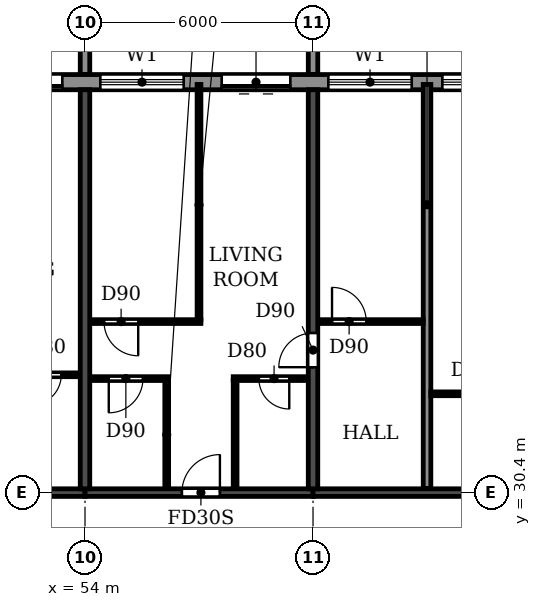
"""IFC4 building model, lengths in metres.
Left out: names, types, materials, properties, quantities, classifications, styles, units other than length and angle.
Written with IfcOpenShell. Run it as: python <this file> out.ifc"""

import sys

from ifc_helpers import new_model, si_unit, direction, frame, frame_2d, origin, place, context, subcontext, project, spatial, polyline, rectangle, outline, extrude, source, transform, mapped, element, fill, save


model = new_model("IFC4")
c1 = context("Model", 3, precision=1e-05, world=origin(), true_north=direction((0.0, 1.0)))
c2 = subcontext(c1, "Body", "Model", "MODEL_VIEW")
j1 = project(units=[si_unit("LENGTHUNIT", "METRE"), si_unit("PLANEANGLEUNIT", "RADIAN")], contexts=[c1])
p1 = place(None, origin())
s1 = spatial("IfcSite", under=j1, at=p1, CompositionType="ELEMENT")
p2 = place(p1, origin())
s2 = spatial("IfcBuilding", under=s1, at=p2, CompositionType="ELEMENT")
p3 = place(p2, frame((0.0, 0.0, 171.9)))
s3 = spatial("IfcBuildingStorey", under=s2, at=p3, CompositionType="ELEMENT", Elevation=171.9)
p4 = place(p3, frame((54.0, 30.5, 0.0), z_axis=(0.0, 0.0, 1.0), x_axis=(0.0, 1.0, 0.0)))
e1 = element("IfcWall", 1, at=p4, inside=s3, PredefinedType="SHEAR", context=c2, shape_type="SweptSolid", body=[
    extrude(rectangle(XDim=10.5, YDim=0.25, at=frame_2d((5.25, 0.0))), origin(), (0.0, 0.0, 1.0), 3.08),
])
p5 = place(p3, frame((60.0, 30.5, 0.0), z_axis=(0.0, 0.0, 1.0), x_axis=(0.0, 1.0, 0.0)))
e2 = element("IfcWall", 2, at=p5, inside=s3, PredefinedType="SHEAR", context=c2, shape_type="SweptSolid", body=[
    extrude(rectangle(XDim=10.5, YDim=0.25, at=frame_2d((5.25, 0.0))), origin(), (0.0, 0.0, 1.0), 3.08),
])
p6 = place(p5, frame((3.2, 0.0, 0.0)))
e3 = element("IfcOpeningElement", 3, at=p6, cuts=e2, PredefinedType="OPENING", context=c2, shape_type="SweptSolid", body=[
    extrude(rectangle(XDim=0.9, YDim=2.1, at=frame_2d((0.45, 1.05))), frame((0.0, 0.135, 0.0), z_axis=(0.0, -1.0, 0.0), x_axis=(1.0, 0.0, 0.0)), (0.0, 0.0, 1.0), 0.27),
])
p7 = place(p3, frame((48.0, 30.4, 0.0), z_axis=(0.0, 0.0, 1.0), x_axis=(1.0, 0.0, 0.0)))
e4 = element("IfcWall", 4, at=p7, inside=s3, PredefinedType="SHEAR", context=c2, shape_type="SweptSolid", body=[
    extrude(rectangle(XDim=6.0, YDim=0.2, at=frame_2d((3.0, 0.0))), origin(), (0.0, 0.0, 1.0), 2.48),
])
p8 = place(p7, frame((2.55, 0.0, 0.0)))
e5 = element("IfcOpeningElement", 5, at=p8, cuts=e4, PredefinedType="OPENING", context=c2, shape_type="SweptSolid", body=[
    extrude(rectangle(XDim=1.0, YDim=2.1, at=frame_2d((0.5, 1.05))), frame((0.0, 0.11, 0.0), z_axis=(0.0, -1.0, 0.0), x_axis=(1.0, 0.0, 0.0)), (0.0, 0.0, 1.0), 0.22),
])
p9 = place(p3, frame((54.0, 30.4, 0.0), z_axis=(0.0, 0.0, 1.0), x_axis=(1.0, 0.0, 0.0)))
e6 = element("IfcWall", 6, at=p9, inside=s3, PredefinedType="SHEAR", context=c2, shape_type="SweptSolid", body=[
    extrude(rectangle(XDim=6.0, YDim=0.2, at=frame_2d((3.0, 0.0))), origin(), (0.0, 0.0, 1.0), 2.48),
])
p10 = place(p9, frame((2.55, 0.0, 0.0)))
e7 = element("IfcOpeningElement", 7, at=p10, cuts=e6, PredefinedType="OPENING", context=c2, shape_type="SweptSolid", body=[
    extrude(rectangle(XDim=1.0, YDim=2.1, at=frame_2d((0.5, 1.05))), frame((0.0, 0.11, 0.0), z_axis=(0.0, -1.0, 0.0), x_axis=(1.0, 0.0, 0.0)), (0.0, 0.0, 1.0), 0.22),
])
p11 = place(p3, frame((60.0, 30.4, 0.0), z_axis=(0.0, 0.0, 1.0), x_axis=(1.0, 0.0, 0.0)))
e8 = element("IfcWall", 8, at=p11, inside=s3, PredefinedType="SHEAR", context=c2, shape_type="SweptSolid", body=[
    extrude(rectangle(XDim=6.0, YDim=0.2, at=frame_2d((3.0, 0.0))), origin(), (0.0, 0.0, 1.0), 2.48),
])
p12 = place(p3, frame((79.317, 41.2, 0.0), z_axis=(0.0, 0.0, 1.0), x_axis=(-1.0, 0.0, 0.0)))
e9 = element("IfcWall", 9, at=p12, inside=s3, PredefinedType="STANDARD", context=c2, shape_type="SweptSolid", body=[
    extrude(rectangle(XDim=56.634, YDim=0.4, at=frame_2d((28.317, 0.0))), origin(), (0.0, 0.0, 1.0), 3.08),
])
p13 = place(p12, frame((52.717, 0.0, 0.9)))
e10 = element("IfcOpeningElement", 10, at=p13, cuts=e9, PredefinedType="OPENING", context=c2, shape_type="SweptSolid", body=[
    extrude(rectangle(XDim=2.2, YDim=1.5, at=frame_2d((1.1, 0.75))), frame((0.0, 0.21, 0.0), z_axis=(0.0, -1.0, 0.0), x_axis=(1.0, 0.0, 0.0)), (0.0, 0.0, 1.0), 0.42),
])
p14 = place(p12, frame((49.917, 0.0, 0.0)))
e11 = element("IfcOpeningElement", 11, at=p14, cuts=e9, PredefinedType="OPENING", context=c2, shape_type="SweptSolid", body=[
    extrude(rectangle(XDim=1.8, YDim=2.4, at=frame_2d((0.9, 1.2))), frame((0.0, 0.21, 0.0), z_axis=(0.0, -1.0, 0.0), x_axis=(1.0, 0.0, 0.0)), (0.0, 0.0, 1.0), 0.42),
])
p15 = place(p12, frame((46.717, 0.0, 0.9)))
e12 = element("IfcOpeningElement", 12, at=p15, cuts=e9, PredefinedType="OPENING", context=c2, shape_type="SweptSolid", body=[
    extrude(rectangle(XDim=2.2, YDim=1.5, at=frame_2d((1.1, 0.75))), frame((0.0, 0.21, 0.0), z_axis=(0.0, -1.0, 0.0), x_axis=(1.0, 0.0, 0.0)), (0.0, 0.0, 1.0), 0.42),
])
p16 = place(p12, frame((43.717, 0.0, 0.9)))
e13 = element("IfcOpeningElement", 13, at=p16, cuts=e9, PredefinedType="OPENING", context=c2, shape_type="SweptSolid", body=[
    extrude(rectangle(XDim=2.2, YDim=1.5, at=frame_2d((1.1, 0.75))), frame((0.0, 0.21, 0.0), z_axis=(0.0, -1.0, 0.0), x_axis=(1.0, 0.0, 0.0)), (0.0, 0.0, 1.0), 0.42),
])
p17 = place(p12, frame((40.917, 0.0, 0.0)))
e14 = element("IfcOpeningElement", 14, at=p17, cuts=e9, PredefinedType="OPENING", context=c2, shape_type="SweptSolid", body=[
    extrude(rectangle(XDim=1.8, YDim=2.4, at=frame_2d((0.9, 1.2))), frame((0.0, 0.21, 0.0), z_axis=(0.0, -1.0, 0.0), x_axis=(1.0, 0.0, 0.0)), (0.0, 0.0, 1.0), 0.42),
])
p18 = place(p12, frame((37.717, 0.0, 0.9)))
e15 = element("IfcOpeningElement", 15, at=p18, cuts=e9, PredefinedType="OPENING", context=c2, shape_type="SweptSolid", body=[
    extrude(rectangle(XDim=2.2, YDim=1.5, at=frame_2d((1.1, 0.75))), frame((0.0, 0.21, 0.0), z_axis=(0.0, -1.0, 0.0), x_axis=(1.0, 0.0, 0.0)), (0.0, 0.0, 1.0), 0.42),
])
p19 = place(p12, frame((34.717, 0.0, 0.9)))
e16 = element("IfcOpeningElement", 16, at=p19, cuts=e9, PredefinedType="OPENING", context=c2, shape_type="SweptSolid", body=[
    extrude(rectangle(XDim=2.2, YDim=1.5, at=frame_2d((1.1, 0.75))), frame((0.0, 0.21, 0.0), z_axis=(0.0, -1.0, 0.0), x_axis=(1.0, 0.0, 0.0)), (0.0, 0.0, 1.0), 0.42),
])
p20 = place(p12, frame((31.717, 0.0, 0.9)))
e17 = element("IfcOpeningElement", 17, at=p20, cuts=e9, PredefinedType="OPENING", context=c2, shape_type="SweptSolid", body=[
    extrude(rectangle(XDim=2.2, YDim=1.5, at=frame_2d((1.1, 0.75))), frame((0.0, 0.21, 0.0), z_axis=(0.0, -1.0, 0.0), x_axis=(1.0, 0.0, 0.0)), (0.0, 0.0, 1.0), 0.42),
])
p21 = place(p12, frame((28.717, 0.0, 0.9)))
e18 = element("IfcOpeningElement", 18, at=p21, cuts=e9, PredefinedType="OPENING", context=c2, shape_type="SweptSolid", body=[
    extrude(rectangle(XDim=2.2, YDim=1.5, at=frame_2d((1.1, 0.75))), frame((0.0, 0.21, 0.0), z_axis=(0.0, -1.0, 0.0), x_axis=(1.0, 0.0, 0.0)), (0.0, 0.0, 1.0), 0.42),
])
p22 = place(p12, frame((25.917, 0.0, 0.0)))
e19 = element("IfcOpeningElement", 19, at=p22, cuts=e9, PredefinedType="OPENING", context=c2, shape_type="SweptSolid", body=[
    extrude(rectangle(XDim=1.8, YDim=2.4, at=frame_2d((0.9, 1.2))), frame((0.0, 0.21, 0.0), z_axis=(0.0, -1.0, 0.0), x_axis=(1.0, 0.0, 0.0)), (0.0, 0.0, 1.0), 0.42),
])
p23 = place(p12, frame((22.717, 0.0, 0.9)))
e20 = element("IfcOpeningElement", 20, at=p23, cuts=e9, PredefinedType="OPENING", context=c2, shape_type="SweptSolid", body=[
    extrude(rectangle(XDim=2.2, YDim=1.5, at=frame_2d((1.1, 0.75))), frame((0.0, 0.21, 0.0), z_axis=(0.0, -1.0, 0.0), x_axis=(1.0, 0.0, 0.0)), (0.0, 0.0, 1.0), 0.42),
])
p24 = place(p12, frame((19.917, 0.0, 0.0)))
e21 = element("IfcOpeningElement", 21, at=p24, cuts=e9, PredefinedType="OPENING", context=c2, shape_type="SweptSolid", body=[
    extrude(rectangle(XDim=1.8, YDim=2.4, at=frame_2d((0.9, 1.2))), frame((0.0, 0.21, 0.0), z_axis=(0.0, -1.0, 0.0), x_axis=(1.0, 0.0, 0.0)), (0.0, 0.0, 1.0), 0.42),
])
p25 = place(p12, frame((16.717, 0.0, 0.9)))
e22 = element("IfcOpeningElement", 22, at=p25, cuts=e9, PredefinedType="OPENING", context=c2, shape_type="SweptSolid", body=[
    extrude(rectangle(XDim=2.2, YDim=1.5, at=frame_2d((1.1, 0.75))), frame((0.0, 0.21, 0.0), z_axis=(0.0, -1.0, 0.0), x_axis=(1.0, 0.0, 0.0)), (0.0, 0.0, 1.0), 0.42),
])
p26 = place(p12, frame((13.717, 0.0, 0.9)))
e23 = element("IfcOpeningElement", 23, at=p26, cuts=e9, PredefinedType="OPENING", context=c2, shape_type="SweptSolid", body=[
    extrude(rectangle(XDim=2.2, YDim=1.5, at=frame_2d((1.1, 0.75))), frame((0.0, 0.21, 0.0), z_axis=(0.0, -1.0, 0.0), x_axis=(1.0, 0.0, 0.0)), (0.0, 0.0, 1.0), 0.42),
])
p27 = place(p12, frame((10.917, 0.0, 0.0)))
e24 = element("IfcOpeningElement", 24, at=p27, cuts=e9, PredefinedType="OPENING", context=c2, shape_type="SweptSolid", body=[
    extrude(rectangle(XDim=1.8, YDim=2.4, at=frame_2d((0.9, 1.2))), frame((0.0, 0.21, 0.0), z_axis=(0.0, -1.0, 0.0), x_axis=(1.0, 0.0, 0.0)), (0.0, 0.0, 1.0), 0.42),
])
p28 = place(p12, frame((7.717, 0.0, 0.9)))
e25 = element("IfcOpeningElement", 25, at=p28, cuts=e9, PredefinedType="OPENING", context=c2, shape_type="SweptSolid", body=[
    extrude(rectangle(XDim=2.2, YDim=1.5, at=frame_2d((1.1, 0.75))), frame((0.0, 0.21, 0.0), z_axis=(0.0, -1.0, 0.0), x_axis=(1.0, 0.0, 0.0)), (0.0, 0.0, 1.0), 0.42),
])
p29 = place(p12, frame((4.717, 0.0, 0.9)))
e26 = element("IfcOpeningElement", 26, at=p29, cuts=e9, PredefinedType="OPENING", context=c2, shape_type="SweptSolid", body=[
    extrude(rectangle(XDim=2.2, YDim=1.5, at=frame_2d((1.1, 0.75))), frame((0.0, 0.21, 0.0), z_axis=(0.0, -1.0, 0.0), x_axis=(1.0, 0.0, 0.0)), (0.0, 0.0, 1.0), 0.42),
])
p30 = place(p12, frame((1.917, 0.0, 0.0)))
e27 = element("IfcOpeningElement", 27, at=p30, cuts=e9, PredefinedType="OPENING", context=c2, shape_type="SweptSolid", body=[
    extrude(rectangle(XDim=1.8, YDim=2.4, at=frame_2d((0.9, 1.2))), frame((0.0, 0.21, 0.0), z_axis=(0.0, -1.0, 0.0), x_axis=(1.0, 0.0, 0.0)), (0.0, 0.0, 1.0), 0.42),
])
m1 = source(origin(), c2, "Body", "SweptSolid", [
    extrude(outline(polyline([(0.0, 0.0), (0.25, 0.0), (0.25, 3.1), (0.0, 3.1), (0.0, 0.0)])), origin(), (0.0, 0.0, 1.0), 3.1),
])
for number, where in (
    (28, (53.875, 41.4, 0.0)),
    (29, (59.875, 41.4, 0.0)),
):
    element("IfcWall", number, at=place(p3, frame(where)), inside=s3, PredefinedType="STANDARD", context=c2, shape_type="MappedRepresentation", body=[
        mapped(m1, transform((0.0, 0.0, 0.0))),
    ])
p31 = place(p3, frame((63.0, 30.51, 0.0), z_axis=(0.0, 0.0, 1.0), x_axis=(0.0, 1.0, 0.0)))
e30 = element("IfcWall", 30, at=p31, inside=s3, PredefinedType="PARTITIONING", context=c2, shape_type="SweptSolid", body=[
    extrude(rectangle(XDim=10.63, YDim=0.2, at=frame_2d((5.315, 0.0))), origin(), (0.0, 0.0, 1.0), 3.08),
])
p32 = place(p3, frame((63.1, 33.0, 0.0), z_axis=(0.0, 0.0, 1.0), x_axis=(1.0, 0.0, 0.0)))
e31 = element("IfcWall", 31, at=p32, inside=s3, PredefinedType="PARTITIONING", context=c2, shape_type="SweptSolid", body=[
    extrude(rectangle(XDim=2.765, YDim=0.1, at=frame_2d((1.382, 0.0))), origin(), (0.0, 0.0, 1.0), 3.08),
])
p33 = place(p32, frame((1.0, 0.0, 0.0)))
e32 = element("IfcOpeningElement", 32, at=p33, cuts=e31, PredefinedType="OPENING", context=c2, shape_type="SweptSolid", body=[
    extrude(rectangle(XDim=0.8, YDim=2.1, at=frame_2d((0.4, 1.05))), frame((0.0, 0.06, 0.0), z_axis=(0.0, -1.0, 0.0), x_axis=(1.0, 0.0, 0.0)), (0.0, 0.0, 1.0), 0.12),
])
p34 = place(p3, frame((54.135, 33.4, 0.0), z_axis=(0.0, 0.0, 1.0), x_axis=(1.0, 0.0, 0.0)))
e33 = element("IfcWall", 33, at=p34, inside=s3, PredefinedType="PARTITIONING", context=c2, shape_type="SweptSolid", body=[
    extrude(rectangle(XDim=2.065, YDim=0.1, at=frame_2d((1.032, 0.0))), origin(), (0.0, 0.0, 1.0), 3.08),
])
p35 = place(p34, frame((0.49, 0.0, 0.0)))
e34 = element("IfcOpeningElement", 34, at=p35, cuts=e33, PredefinedType="OPENING", context=c2, shape_type="SweptSolid", body=[
    extrude(rectangle(XDim=0.9, YDim=2.1, at=frame_2d((0.45, 1.05))), frame((0.0, 0.06, 0.0), z_axis=(0.0, -1.0, 0.0), x_axis=(1.0, 0.0, 0.0)), (0.0, 0.0, 1.0), 0.12),
])
p36 = place(p3, frame((57.9, 33.4, 0.0), z_axis=(0.0, 0.0, 1.0), x_axis=(1.0, 0.0, 0.0)))
e35 = element("IfcWall", 35, at=p36, inside=s3, PredefinedType="PARTITIONING", context=c2, shape_type="SweptSolid", body=[
    extrude(rectangle(XDim=1.965, YDim=0.1, at=frame_2d((0.982, 0.0))), origin(), (0.0, 0.0, 1.0), 3.08),
])
p37 = place(p36, frame((0.675, 0.0, 0.0)))
e36 = element("IfcOpeningElement", 36, at=p37, cuts=e35, PredefinedType="OPENING", context=c2, shape_type="SweptSolid", body=[
    extrude(rectangle(XDim=0.8, YDim=2.1, at=frame_2d((0.4, 1.05))), frame((0.0, 0.06, 0.0), z_axis=(0.0, -1.0, 0.0), x_axis=(1.0, 0.0, 0.0)), (0.0, 0.0, 1.0), 0.12),
])
p38 = place(p3, frame((51.9, 33.5, 0.0), z_axis=(0.0, 0.0, 1.0), x_axis=(1.0, 0.0, 0.0)))
e37 = element("IfcWall", 37, at=p38, inside=s3, PredefinedType="PARTITIONING", context=c2, shape_type="SweptSolid", body=[
    extrude(rectangle(XDim=1.965, YDim=0.1, at=frame_2d((0.982, 0.0))), origin(), (0.0, 0.0, 1.0), 3.08),
])
p39 = place(p38, frame((0.675, 0.0, 0.0)))
e38 = element("IfcOpeningElement", 38, at=p39, cuts=e37, PredefinedType="OPENING", context=c2, shape_type="SweptSolid", body=[
    extrude(rectangle(XDim=0.8, YDim=2.1, at=frame_2d((0.4, 1.05))), frame((0.0, 0.06, 0.0), z_axis=(0.0, -1.0, 0.0), x_axis=(1.0, 0.0, 0.0)), (0.0, 0.0, 1.0), 0.12),
])
p40 = place(p3, frame((54.135, 34.9, 0.0), z_axis=(0.0, 0.0, 1.0), x_axis=(1.0, 0.0, 0.0)))
e39 = element("IfcWall", 39, at=p40, inside=s3, PredefinedType="PARTITIONING", context=c2, shape_type="SweptSolid", body=[
    extrude(rectangle(XDim=2.915, YDim=0.1, at=frame_2d((1.458, 0.0))), origin(), (0.0, 0.0, 1.0), 3.08),
])
p41 = place(p40, frame((0.365, 0.0, 0.0)))
e40 = element("IfcOpeningElement", 40, at=p41, cuts=e39, PredefinedType="OPENING", context=c2, shape_type="SweptSolid", body=[
    extrude(rectangle(XDim=0.9, YDim=2.1, at=frame_2d((0.45, 1.05))), frame((0.0, 0.06, 0.0), z_axis=(0.0, -1.0, 0.0), x_axis=(1.0, 0.0, 0.0)), (0.0, 0.0, 1.0), 0.12),
])
p42 = place(p3, frame((60.135, 34.9, 0.0), z_axis=(0.0, 0.0, 1.0), x_axis=(1.0, 0.0, 0.0)))
e41 = element("IfcWall", 41, at=p42, inside=s3, PredefinedType="PARTITIONING", context=c2, shape_type="SweptSolid", body=[
    extrude(rectangle(XDim=2.765, YDim=0.1, at=frame_2d((1.382, 0.0))), origin(), (0.0, 0.0, 1.0), 3.08),
])
p43 = place(p42, frame((0.365, 0.0, 0.0)))
e42 = element("IfcOpeningElement", 42, at=p43, cuts=e41, PredefinedType="OPENING", context=c2, shape_type="SweptSolid", body=[
    extrude(rectangle(XDim=0.9, YDim=2.1, at=frame_2d((0.45, 1.05))), frame((0.0, 0.06, 0.0), z_axis=(0.0, -1.0, 0.0), x_axis=(1.0, 0.0, 0.0)), (0.0, 0.0, 1.0), 0.12),
])
p44 = place(p3, frame((56.15, 30.51, 0.0), z_axis=(0.0, 0.0, 1.0), x_axis=(0.0, 1.0, 0.0)))
e43 = element("IfcWall", 43, at=p44, inside=s3, PredefinedType="PARTITIONING", context=c2, shape_type="SweptSolid", body=[
    extrude(rectangle(XDim=2.84, YDim=0.1, at=frame_2d((1.42, 0.0))), origin(), (0.0, 0.0, 1.0), 3.08),
])
p45 = place(p3, frame((57.0, 34.95, 0.0), z_axis=(0.0, 0.0, 1.0), x_axis=(0.0, 1.0, 0.0)))
e44 = element("IfcWall", 44, at=p45, inside=s3, PredefinedType="PARTITIONING", context=c2, shape_type="SweptSolid", body=[
    extrude(rectangle(XDim=6.19, YDim=0.1, at=frame_2d((3.095, 0.0))), origin(), (0.0, 0.0, 1.0), 3.08),
])
p46 = place(p3, frame((57.95, 30.51, 0.0), z_axis=(0.0, 0.0, 1.0), x_axis=(0.0, 1.0, 0.0)))
e45 = element("IfcWall", 45, at=p46, inside=s3, PredefinedType="PARTITIONING", context=c2, shape_type="SweptSolid", body=[
    extrude(rectangle(XDim=2.84, YDim=0.1, at=frame_2d((1.42, 0.0))), origin(), (0.0, 0.0, 1.0), 3.08),
])
p47 = place(p22, origin())
e46 = element("IfcDoor", 46, at=p47, inside=s3, OperationType="DOUBLE_DOOR_SLIDING", PredefinedType="DOOR", context=c2, shape_type="SweptSolid", body=[
    extrude(rectangle(XDim=1.8, YDim=2.4, at=frame_2d((0.9, 1.2))), frame((0.0, 0.025, 0.0), z_axis=(0.0, -1.0, 0.0), x_axis=(1.0, 0.0, 0.0)), (0.0, 0.0, 1.0), 0.05),
])
fill(e19, e46)
p48 = place(p23, origin())
e47 = element("IfcWindow", 47, at=p48, inside=s3, PartitioningType="DOUBLE_PANEL_HORIZONTAL", PredefinedType="WINDOW", context=c2, shape_type="SweptSolid", body=[
    extrude(rectangle(XDim=2.2, YDim=1.5, at=frame_2d((1.1, 0.75))), frame((0.0, 0.03, 0.0), z_axis=(0.0, -1.0, 0.0), x_axis=(1.0, 0.0, 0.0)), (0.0, 0.0, 1.0), 0.06),
])
fill(e20, e47)
p49 = place(p24, origin())
e48 = element("IfcDoor", 48, at=p49, inside=s3, OperationType="DOUBLE_DOOR_SLIDING", PredefinedType="DOOR", context=c2, shape_type="SweptSolid", body=[
    extrude(rectangle(XDim=1.8, YDim=2.4, at=frame_2d((0.9, 1.2))), frame((0.0, 0.025, 0.0), z_axis=(0.0, -1.0, 0.0), x_axis=(1.0, 0.0, 0.0)), (0.0, 0.0, 1.0), 0.05),
])
fill(e21, e48)
p50 = place(p25, origin())
e49 = element("IfcWindow", 49, at=p50, inside=s3, PartitioningType="DOUBLE_PANEL_HORIZONTAL", PredefinedType="WINDOW", context=c2, shape_type="SweptSolid", body=[
    extrude(rectangle(XDim=2.2, YDim=1.5, at=frame_2d((1.1, 0.75))), frame((0.0, 0.03, 0.0), z_axis=(0.0, -1.0, 0.0), x_axis=(1.0, 0.0, 0.0)), (0.0, 0.0, 1.0), 0.06),
])
fill(e22, e49)
p51 = place(p26, origin())
e50 = element("IfcWindow", 50, at=p51, inside=s3, PartitioningType="DOUBLE_PANEL_HORIZONTAL", PredefinedType="WINDOW", context=c2, shape_type="SweptSolid", body=[
    extrude(rectangle(XDim=2.2, YDim=1.5, at=frame_2d((1.1, 0.75))), frame((0.0, 0.03, 0.0), z_axis=(0.0, -1.0, 0.0), x_axis=(1.0, 0.0, 0.0)), (0.0, 0.0, 1.0), 0.06),
])
fill(e23, e50)
p52 = place(p39, frame((0.8, 0.0, 0.0), z_axis=(0.0, 0.0, 1.0), x_axis=(-1.0, 0.0, 0.0)))
e51 = element("IfcDoor", 51, at=p52, inside=s3, OperationType="SINGLE_SWING_RIGHT", PredefinedType="DOOR", context=c2, shape_type="SweptSolid", body=[
    extrude(rectangle(XDim=0.8, YDim=2.1, at=frame_2d((0.4, 1.05))), frame((0.0, 0.025, 0.0), z_axis=(0.0, -1.0, 0.0), x_axis=(1.0, 0.0, 0.0)), (0.0, 0.0, 1.0), 0.05),
])
fill(e38, e51)
p53 = place(p43, origin())
e52 = element("IfcDoor", 52, at=p53, inside=s3, OperationType="SINGLE_SWING_LEFT", PredefinedType="DOOR", context=c2, shape_type="SweptSolid", body=[
    extrude(rectangle(XDim=0.9, YDim=2.1, at=frame_2d((0.45, 1.05))), frame((0.0, 0.025, 0.0), z_axis=(0.0, -1.0, 0.0), x_axis=(1.0, 0.0, 0.0)), (0.0, 0.0, 1.0), 0.05),
])
fill(e42, e52)
p54 = place(p41, frame((0.9, 0.0, 0.0), z_axis=(0.0, 0.0, 1.0), x_axis=(-1.0, 0.0, 0.0)))
e53 = element("IfcDoor", 53, at=p54, inside=s3, OperationType="SINGLE_SWING_LEFT", PredefinedType="DOOR", context=c2, shape_type="SweptSolid", body=[
    extrude(rectangle(XDim=0.9, YDim=2.1, at=frame_2d((0.45, 1.05))), frame((0.0, 0.025, 0.0), z_axis=(0.0, -1.0, 0.0), x_axis=(1.0, 0.0, 0.0)), (0.0, 0.0, 1.0), 0.05),
])
fill(e40, e53)
p55 = place(p35, frame((0.9, 0.0, 0.0), z_axis=(0.0, 0.0, 1.0), x_axis=(-1.0, 0.0, 0.0)))
e54 = element("IfcDoor", 54, at=p55, inside=s3, OperationType="SINGLE_SWING_RIGHT", PredefinedType="DOOR", context=c2, shape_type="SweptSolid", body=[
    extrude(rectangle(XDim=0.9, YDim=2.1, at=frame_2d((0.45, 1.05))), frame((0.0, 0.025, 0.0), z_axis=(0.0, -1.0, 0.0), x_axis=(1.0, 0.0, 0.0)), (0.0, 0.0, 1.0), 0.05),
])
fill(e34, e54)
p56 = place(p10, origin())
e55 = element("IfcDoor", 55, at=p56, inside=s3, OperationType="SINGLE_SWING_RIGHT", PredefinedType="DOOR", context=c2, shape_type="SweptSolid", body=[
    extrude(rectangle(XDim=1.0, YDim=2.1, at=frame_2d((0.5, 1.05))), frame((0.0, 0.025, 0.0), z_axis=(0.0, -1.0, 0.0), x_axis=(1.0, 0.0, 0.0)), (0.0, 0.0, 1.0), 0.05),
])
fill(e7, e55)
p57 = place(p37, frame((0.8, 0.0, 0.0), z_axis=(0.0, 0.0, 1.0), x_axis=(-1.0, 0.0, 0.0)))
e56 = element("IfcDoor", 56, at=p57, inside=s3, OperationType="SINGLE_SWING_LEFT", PredefinedType="DOOR", context=c2, shape_type="SweptSolid", body=[
    extrude(rectangle(XDim=0.8, YDim=2.1, at=frame_2d((0.4, 1.05))), frame((0.0, 0.025, 0.0), z_axis=(0.0, -1.0, 0.0), x_axis=(1.0, 0.0, 0.0)), (0.0, 0.0, 1.0), 0.05),
])
fill(e36, e56)
p58 = place(p6, origin())
e57 = element("IfcDoor", 57, at=p58, inside=s3, OperationType="SINGLE_SWING_LEFT", PredefinedType="DOOR", context=c2, shape_type="SweptSolid", body=[
    extrude(rectangle(XDim=0.9, YDim=2.1, at=frame_2d((0.45, 1.05))), frame((0.0, 0.025, 0.0), z_axis=(0.0, -1.0, 0.0), x_axis=(1.0, 0.0, 0.0)), (0.0, 0.0, 1.0), 0.05),
])
fill(e3, e57)
save(model, sys.argv[1])
